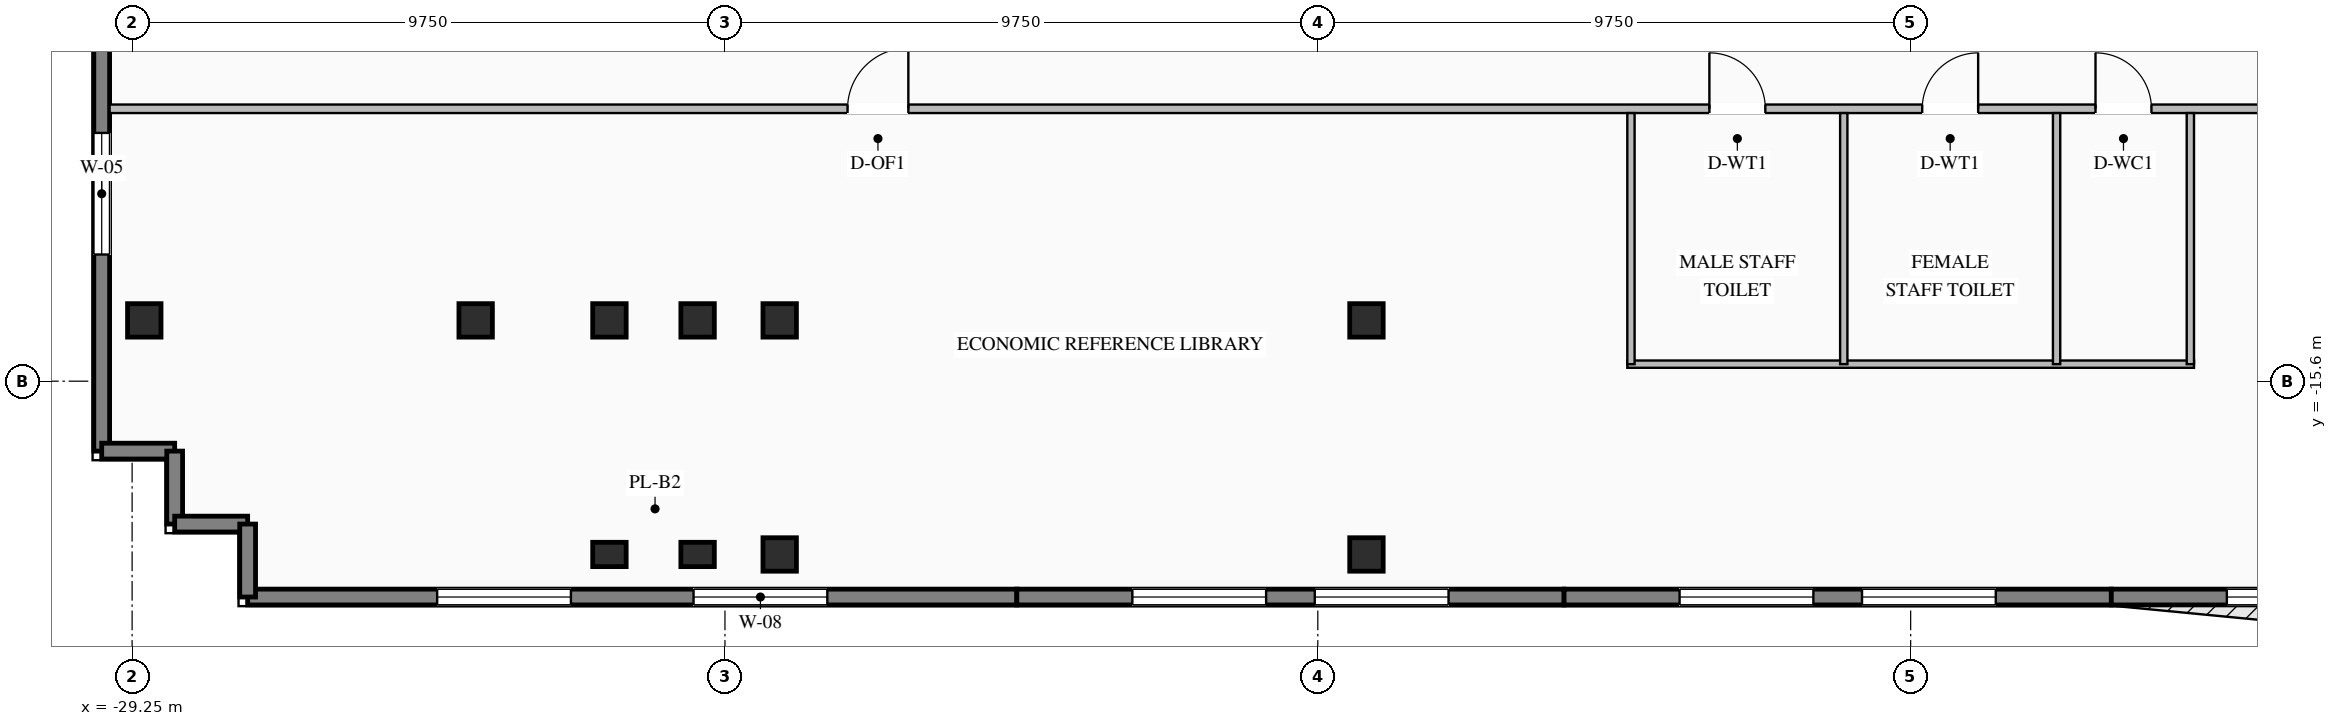
"""IFC4 building model, lengths in metres.
Left out: names, types, materials, properties, quantities, classifications, styles, units other than length and angle.
Written with IfcOpenShell. Run it as: python <this file> out.ifc"""

import sys

from ifc_helpers import new_model, si_unit, direction, frame, frame_2d, origin, origin_2d, place, context, subcontext, project, spatial, rectangle, i_section, extrude, element, fill, save


model = new_model("IFC4")
c1 = context("Model", 3, precision=1e-05, world=origin(), true_north=direction((0.0, 1.0)))
c2 = subcontext(c1, "Body", "Model", "MODEL_VIEW")
j1 = project(units=[si_unit("LENGTHUNIT", "METRE"), si_unit("PLANEANGLEUNIT", "RADIAN")], contexts=[c1])
p1 = place(None, origin())
s1 = spatial("IfcSite", under=j1, at=p1, CompositionType="ELEMENT")
p2 = place(p1, origin())
s2 = spatial("IfcBuilding", under=s1, at=p2, CompositionType="ELEMENT")
p3 = place(p2, frame((0.0, 0.0, 204.3)))
s3 = spatial("IfcBuildingStorey", under=s2, at=p3, CompositionType="ELEMENT", Elevation=204.3)
for number, where, z_axis, x_axis in (
    (1, (-21.4, -14.6, 0.0), (0.0, 0.0, 1.0), (1.0, 0.0, 0.0)),
    (2, (-19.95, -14.6, 0.0), (0.0, 0.0, 1.0), (1.0, 0.0, 0.0)),
    (3, (-18.6, -14.6, 0.0), (0.0, 0.0, 1.0), (1.0, 0.0, 0.0)),
    (4, (-8.95, -14.6, 0.0), (0.0, 0.0, 1.0), (1.0, 0.0, 0.0)),
    (5, (-23.6, -14.6, 0.0), (0.0, 0.0, 1.0), (1.0, 0.0, 0.0)),
):
    element("IfcColumn", number, at=place(p3, frame(where, z_axis=z_axis, x_axis=x_axis)), inside=s3, PredefinedType="COLUMN", context=c2, shape_type="SweptSolid", body=[
        extrude(i_section(OverallWidth=0.55, OverallDepth=0.55, WebThickness=0.024, FlangeThickness=0.036, at=origin_2d()), origin(), (0.0, 0.0, 1.0), 4.2),
    ])
for number, where, z_axis, x_axis in (
    (6, (-18.6, -18.45, -0.28), (0.0, 0.0, 1.0), (1.0, 0.0, 0.0)),
    (7, (-8.95, -18.45, -0.28), (0.0, 0.0, 1.0), (1.0, 0.0, 0.0)),
    (8, (-29.05, -14.6, -0.28), (0.0, 0.0, 1.0), (1.0, 0.0, 0.0)),
):
    element("IfcColumn", number, at=place(p3, frame(where, z_axis=z_axis, x_axis=x_axis)), inside=s3, PredefinedType="COLUMN", context=c2, shape_type="SweptSolid", body=[
        extrude(i_section(OverallWidth=0.55, OverallDepth=0.55, WebThickness=0.024, FlangeThickness=0.036, at=origin_2d()), origin(), (0.0, 0.0, 1.0), 4.48),
    ])
for number, where, z_axis, x_axis in (
    (9, (-21.4, -18.45, -0.28), (0.0, 0.0, 1.0), (1.0, 0.0, 0.0)),
    (10, (-19.95, -18.45, -0.28), (0.0, 0.0, 1.0), (1.0, 0.0, 0.0)),
):
    element("IfcColumn", number, at=place(p3, frame(where, z_axis=z_axis, x_axis=x_axis)), inside=s3, PredefinedType="PILASTER", context=c2, shape_type="SweptSolid", body=[
        extrude(rectangle(XDim=0.55, YDim=0.4, at=origin_2d()), origin(), (0.0, 0.0, 1.0), 4.48),
    ])
p4 = place(p3, frame((-14.7, -19.15, 0.0), z_axis=(0.0, 0.0, 1.0), x_axis=(-1.0, 0.0, 0.0)))
e11 = element("IfcWall", 11, at=p4, inside=s3, PredefinedType="STANDARD", context=c2, shape_type="SweptSolid", body=[
    extrude(rectangle(XDim=12.65, YDim=0.26, at=frame_2d((6.325, 0.0))), origin(), (0.0, 0.0, 1.0), 4.0),
])
p5 = place(p4, frame((3.117, 0.0, 0.76)))
e12 = element("IfcOpeningElement", 12, at=p5, cuts=e11, PredefinedType="OPENING", context=c2, shape_type="SweptSolid", body=[
    extrude(rectangle(XDim=2.2, YDim=2.25, at=frame_2d((1.1, 1.125))), frame((0.0, 0.14, 0.0), z_axis=(0.0, -1.0, 0.0), x_axis=(1.0, 0.0, 0.0)), (0.0, 0.0, 1.0), 0.28),
])
p6 = place(p4, frame((7.333, 0.0, 0.76)))
e13 = element("IfcOpeningElement", 13, at=p6, cuts=e11, PredefinedType="OPENING", context=c2, shape_type="SweptSolid", body=[
    extrude(rectangle(XDim=2.2, YDim=2.25, at=frame_2d((1.1, 1.125))), frame((0.0, 0.14, 0.0), z_axis=(0.0, -1.0, 0.0), x_axis=(1.0, 0.0, 0.0)), (0.0, 0.0, 1.0), 0.28),
])
p7 = place(p3, frame((-5.7, -19.15, 0.0), z_axis=(0.0, 0.0, 1.0), x_axis=(-1.0, 0.0, 0.0)))
e14 = element("IfcWall", 14, at=p7, inside=s3, PredefinedType="STANDARD", context=c2, shape_type="SweptSolid", body=[
    extrude(rectangle(XDim=9.0, YDim=0.26, at=frame_2d((4.5, 0.0))), origin(), (0.0, 0.0, 1.0), 4.0),
])
p8 = place(p7, frame((1.9, 0.0, 0.76)))
e15 = element("IfcOpeningElement", 15, at=p8, cuts=e14, PredefinedType="OPENING", context=c2, shape_type="SweptSolid", body=[
    extrude(rectangle(XDim=2.2, YDim=2.25, at=frame_2d((1.1, 1.125))), frame((0.0, 0.14, 0.0), z_axis=(0.0, -1.0, 0.0), x_axis=(1.0, 0.0, 0.0)), (0.0, 0.0, 1.0), 0.28),
])
p9 = place(p7, frame((4.9, 0.0, 0.76)))
e16 = element("IfcOpeningElement", 16, at=p9, cuts=e14, PredefinedType="OPENING", context=c2, shape_type="SweptSolid", body=[
    extrude(rectangle(XDim=2.2, YDim=2.25, at=frame_2d((1.1, 1.125))), frame((0.0, 0.14, 0.0), z_axis=(0.0, -1.0, 0.0), x_axis=(1.0, 0.0, 0.0)), (0.0, 0.0, 1.0), 0.28),
])
p10 = place(p3, frame((3.3, -19.15, 0.0), z_axis=(0.0, 0.0, 1.0), x_axis=(-1.0, 0.0, 0.0)))
e17 = element("IfcWall", 17, at=p10, inside=s3, PredefinedType="STANDARD", context=c2, shape_type="SweptSolid", body=[
    extrude(rectangle(XDim=9.0, YDim=0.26, at=frame_2d((4.5, 0.0))), origin(), (0.0, 0.0, 1.0), 4.0),
])
p11 = place(p10, frame((1.9, 0.0, 0.76)))
e18 = element("IfcOpeningElement", 18, at=p11, cuts=e17, PredefinedType="OPENING", context=c2, shape_type="SweptSolid", body=[
    extrude(rectangle(XDim=2.2, YDim=2.25, at=frame_2d((1.1, 1.125))), frame((0.0, 0.14, 0.0), z_axis=(0.0, -1.0, 0.0), x_axis=(1.0, 0.0, 0.0)), (0.0, 0.0, 1.0), 0.28),
])
p12 = place(p10, frame((4.9, 0.0, 0.76)))
e19 = element("IfcOpeningElement", 19, at=p12, cuts=e17, PredefinedType="OPENING", context=c2, shape_type="SweptSolid", body=[
    extrude(rectangle(XDim=2.2, YDim=2.25, at=frame_2d((1.1, 1.125))), frame((0.0, 0.14, 0.0), z_axis=(0.0, -1.0, 0.0), x_axis=(1.0, 0.0, 0.0)), (0.0, 0.0, 1.0), 0.28),
])
p13 = place(p3, frame((12.3, -19.15, 0.0), z_axis=(0.0, 0.0, 1.0), x_axis=(-1.0, 0.0, 0.0)))
e20 = element("IfcWall", 20, at=p13, inside=s3, PredefinedType="STANDARD", context=c2, shape_type="SweptSolid", body=[
    extrude(rectangle(XDim=9.0, YDim=0.26, at=frame_2d((4.5, 0.0))), origin(), (0.0, 0.0, 1.0), 4.0),
])
p14 = place(p13, frame((1.9, 0.0, 0.76)))
e21 = element("IfcOpeningElement", 21, at=p14, cuts=e20, PredefinedType="OPENING", context=c2, shape_type="SweptSolid", body=[
    extrude(rectangle(XDim=2.2, YDim=2.25, at=frame_2d((1.1, 1.125))), frame((0.0, 0.14, 0.0), z_axis=(0.0, -1.0, 0.0), x_axis=(1.0, 0.0, 0.0)), (0.0, 0.0, 1.0), 0.28),
])
p15 = place(p13, frame((4.9, 0.0, 0.76)))
e22 = element("IfcOpeningElement", 22, at=p15, cuts=e20, PredefinedType="OPENING", context=c2, shape_type="SweptSolid", body=[
    extrude(rectangle(XDim=2.2, YDim=2.25, at=frame_2d((1.1, 1.125))), frame((0.0, 0.14, 0.0), z_axis=(0.0, -1.0, 0.0), x_axis=(1.0, 0.0, 0.0)), (0.0, 0.0, 1.0), 0.28),
])
p16 = place(p3, frame((-29.75, -16.75, 0.0), z_axis=(0.0, 0.0, 1.0), x_axis=(0.0, 1.0, 0.0)))
e23 = element("IfcWall", 23, at=p16, inside=s3, PredefinedType="STANDARD", context=c2, shape_type="SweptSolid", body=[
    extrude(rectangle(XDim=15.85, YDim=0.26, at=frame_2d((7.925, 0.0))), origin(), (0.0, 0.0, 1.0), 4.0),
])
p17 = place(p16, frame((3.233, 0.0, 0.76)))
e24 = element("IfcOpeningElement", 24, at=p17, cuts=e23, PredefinedType="OPENING", context=c2, shape_type="SweptSolid", body=[
    extrude(rectangle(XDim=2.0, YDim=2.05, at=frame_2d((1.0, 1.025))), frame((0.0, 0.14, 0.0), z_axis=(0.0, -1.0, 0.0), x_axis=(1.0, 0.0, 0.0)), (0.0, 0.0, 1.0), 0.28),
])
p18 = place(p16, frame((9.567, 0.0, 0.76)))
e25 = element("IfcOpeningElement", 25, at=p18, cuts=e23, PredefinedType="OPENING", context=c2, shape_type="SweptSolid", body=[
    extrude(rectangle(XDim=2.0, YDim=2.05, at=frame_2d((1.0, 1.025))), frame((0.0, 0.14, 0.0), z_axis=(0.0, -1.0, 0.0), x_axis=(1.0, 0.0, 0.0)), (0.0, 0.0, 1.0), 0.28),
])
for number, where, z_axis, x_axis in (
    (26, (-29.75, -16.75, 0.0), (0.0, 0.0, 1.0), (1.0, 0.0, 0.0)),
    (27, (-28.55, -16.75, 0.0), (0.0, 0.0, 1.0), (0.0, -1.0, 0.0)),
    (28, (-28.55, -17.95, 0.0), (0.0, 0.0, 1.0), (1.0, 0.0, 0.0)),
    (29, (-27.35, -17.95, 0.0), (0.0, 0.0, 1.0), (0.0, -1.0, 0.0)),
):
    element("IfcWall", number, at=place(p3, frame(where, z_axis=z_axis, x_axis=x_axis)), inside=s3, PredefinedType="STANDARD", context=c2, shape_type="SweptSolid", body=[
        extrude(rectangle(XDim=1.2, YDim=0.26, at=frame_2d((0.6, 0.0))), origin(), (0.0, 0.0, 1.0), 4.0),
    ])
p19 = place(p3, frame((-29.62, -11.12, 0.0), z_axis=(0.0, 0.0, 1.0), x_axis=(1.0, 0.0, 0.0)))
e30 = element("IfcWall", 30, at=p19, inside=s3, PredefinedType="STANDARD", context=c2, shape_type="SweptSolid", body=[
    extrude(rectangle(XDim=56.84, YDim=0.14, at=frame_2d((28.42, 0.0))), origin(), (0.0, 0.0, 1.0), 4.0),
])
p20 = place(p19, frame((26.31, 0.0, 0.0)))
e31 = element("IfcOpeningElement", 31, at=p20, cuts=e30, PredefinedType="OPENING", context=c2, shape_type="SweptSolid", body=[
    extrude(rectangle(XDim=0.92, YDim=2.08, at=frame_2d((0.46, 1.04))), frame((0.0, 0.08, 0.0), z_axis=(0.0, -1.0, 0.0), x_axis=(1.0, 0.0, 0.0)), (0.0, 0.0, 1.0), 0.16),
])
p21 = place(p19, frame((29.81, 0.0, 0.0)))
e32 = element("IfcOpeningElement", 32, at=p21, cuts=e30, PredefinedType="OPENING", context=c2, shape_type="SweptSolid", body=[
    extrude(rectangle(XDim=0.92, YDim=2.08, at=frame_2d((0.46, 1.04))), frame((0.0, 0.08, 0.0), z_axis=(0.0, -1.0, 0.0), x_axis=(1.0, 0.0, 0.0)), (0.0, 0.0, 1.0), 0.16),
])
p22 = place(p19, frame((32.66, 0.0, 0.0)))
e33 = element("IfcOpeningElement", 33, at=p22, cuts=e30, PredefinedType="OPENING", context=c2, shape_type="SweptSolid", body=[
    extrude(rectangle(XDim=0.92, YDim=2.08, at=frame_2d((0.46, 1.04))), frame((0.0, 0.08, 0.0), z_axis=(0.0, -1.0, 0.0), x_axis=(1.0, 0.0, 0.0)), (0.0, 0.0, 1.0), 0.16),
])
p23 = place(p19, frame((12.136, 0.0, 0.0)))
e34 = element("IfcOpeningElement", 34, at=p23, cuts=e30, PredefinedType="OPENING", context=c2, shape_type="SweptSolid", body=[
    extrude(rectangle(XDim=1.0, YDim=2.08, at=frame_2d((0.5, 1.04))), frame((0.0, 0.08, 0.0), z_axis=(0.0, -1.0, 0.0), x_axis=(1.0, 0.0, 0.0)), (0.0, 0.0, 1.0), 0.16),
])
p24 = place(p19, frame((44.904, 0.0, 0.0)))
e35 = element("IfcOpeningElement", 35, at=p24, cuts=e30, PredefinedType="OPENING", context=c2, shape_type="SweptSolid", body=[
    extrude(rectangle(XDim=1.0, YDim=2.08, at=frame_2d((0.5, 1.04))), frame((0.0, 0.08, 0.0), z_axis=(0.0, -1.0, 0.0), x_axis=(1.0, 0.0, 0.0)), (0.0, 0.0, 1.0), 0.16),
])
p25 = place(p3, frame((-4.66, -15.32, 0.0), z_axis=(0.0, 0.0, 1.0), x_axis=(1.0, 0.0, 0.0)))
e36 = element("IfcWall", 36, at=p25, inside=s3, PredefinedType="STANDARD", context=c2, shape_type="SweptSolid", body=[
    extrude(rectangle(XDim=9.32, YDim=0.12, at=frame_2d((4.66, 0.0))), origin(), (0.0, 0.0, 1.0), 4.0),
])
for number, where, z_axis, x_axis in (
    (37, (-4.6, -15.32, 0.0), (0.0, 0.0, 1.0), (0.0, 1.0, 0.0)),
    (38, (-1.1, -15.32, 0.0), (0.0, 0.0, 1.0), (0.0, 1.0, 0.0)),
    (39, (2.4, -15.32, 0.0), (0.0, 0.0, 1.0), (0.0, 1.0, 0.0)),
    (40, (4.6, -15.32, 0.0), (0.0, 0.0, 1.0), (0.0, 1.0, 0.0)),
):
    element("IfcWall", number, at=place(p3, frame(where, z_axis=z_axis, x_axis=x_axis)), inside=s3, PredefinedType="STANDARD", context=c2, shape_type="SweptSolid", body=[
        extrude(rectangle(XDim=4.13, YDim=0.12, at=frame_2d((2.065, 0.0))), origin(), (0.0, 0.0, 1.0), 4.0),
    ])
p26 = place(p5, origin())
e41 = element("IfcWindow", 41, at=p26, inside=s3, PartitioningType="DOUBLE_PANEL_VERTICAL", PredefinedType="WINDOW", context=c2, shape_type="SweptSolid", body=[
    extrude(rectangle(XDim=2.2, YDim=2.25, at=frame_2d((1.1, 1.125))), frame((0.0, 0.03, 0.0), z_axis=(0.0, -1.0, 0.0), x_axis=(1.0, 0.0, 0.0)), (0.0, 0.0, 1.0), 0.06),
])
fill(e12, e41)
p27 = place(p6, origin())
e42 = element("IfcWindow", 42, at=p27, inside=s3, PartitioningType="DOUBLE_PANEL_VERTICAL", PredefinedType="WINDOW", context=c2, shape_type="SweptSolid", body=[
    extrude(rectangle(XDim=2.2, YDim=2.25, at=frame_2d((1.1, 1.125))), frame((0.0, 0.03, 0.0), z_axis=(0.0, -1.0, 0.0), x_axis=(1.0, 0.0, 0.0)), (0.0, 0.0, 1.0), 0.06),
])
fill(e13, e42)
p28 = place(p8, origin())
e43 = element("IfcWindow", 43, at=p28, inside=s3, PartitioningType="DOUBLE_PANEL_VERTICAL", PredefinedType="WINDOW", context=c2, shape_type="SweptSolid", body=[
    extrude(rectangle(XDim=2.2, YDim=2.25, at=frame_2d((1.1, 1.125))), frame((0.0, 0.03, 0.0), z_axis=(0.0, -1.0, 0.0), x_axis=(1.0, 0.0, 0.0)), (0.0, 0.0, 1.0), 0.06),
])
fill(e15, e43)
p29 = place(p9, origin())
e44 = element("IfcWindow", 44, at=p29, inside=s3, PartitioningType="DOUBLE_PANEL_VERTICAL", PredefinedType="WINDOW", context=c2, shape_type="SweptSolid", body=[
    extrude(rectangle(XDim=2.2, YDim=2.25, at=frame_2d((1.1, 1.125))), frame((0.0, 0.03, 0.0), z_axis=(0.0, -1.0, 0.0), x_axis=(1.0, 0.0, 0.0)), (0.0, 0.0, 1.0), 0.06),
])
fill(e16, e44)
p30 = place(p11, origin())
e45 = element("IfcWindow", 45, at=p30, inside=s3, PartitioningType="DOUBLE_PANEL_VERTICAL", PredefinedType="WINDOW", context=c2, shape_type="SweptSolid", body=[
    extrude(rectangle(XDim=2.2, YDim=2.25, at=frame_2d((1.1, 1.125))), frame((0.0, 0.03, 0.0), z_axis=(0.0, -1.0, 0.0), x_axis=(1.0, 0.0, 0.0)), (0.0, 0.0, 1.0), 0.06),
])
fill(e18, e45)
p31 = place(p12, origin())
e46 = element("IfcWindow", 46, at=p31, inside=s3, PartitioningType="DOUBLE_PANEL_VERTICAL", PredefinedType="WINDOW", context=c2, shape_type="SweptSolid", body=[
    extrude(rectangle(XDim=2.2, YDim=2.25, at=frame_2d((1.1, 1.125))), frame((0.0, 0.03, 0.0), z_axis=(0.0, -1.0, 0.0), x_axis=(1.0, 0.0, 0.0)), (0.0, 0.0, 1.0), 0.06),
])
fill(e19, e46)
p32 = place(p15, origin())
e47 = element("IfcWindow", 47, at=p32, inside=s3, PartitioningType="DOUBLE_PANEL_VERTICAL", PredefinedType="WINDOW", context=c2, shape_type="SweptSolid", body=[
    extrude(rectangle(XDim=2.2, YDim=2.25, at=frame_2d((1.1, 1.125))), frame((0.0, 0.03, 0.0), z_axis=(0.0, -1.0, 0.0), x_axis=(1.0, 0.0, 0.0)), (0.0, 0.0, 1.0), 0.06),
])
fill(e22, e47)
p33 = place(p17, origin())
e48 = element("IfcWindow", 48, at=p33, inside=s3, PartitioningType="DOUBLE_PANEL_VERTICAL", PredefinedType="WINDOW", context=c2, shape_type="SweptSolid", body=[
    extrude(rectangle(XDim=2.0, YDim=2.05, at=frame_2d((1.0, 1.025))), frame((0.0, 0.03, 0.0), z_axis=(0.0, -1.0, 0.0), x_axis=(1.0, 0.0, 0.0)), (0.0, 0.0, 1.0), 0.06),
])
fill(e24, e48)
p34 = place(p20, origin())
e49 = element("IfcDoor", 49, at=p34, inside=s3, OperationType="SINGLE_SWING_LEFT", PredefinedType="DOOR", context=c2, shape_type="SweptSolid", body=[
    extrude(rectangle(XDim=0.92, YDim=2.08, at=frame_2d((0.46, 1.04))), frame((0.0, 0.025, 0.0), z_axis=(0.0, -1.0, 0.0), x_axis=(1.0, 0.0, 0.0)), (0.0, 0.0, 1.0), 0.05),
])
fill(e31, e49)
p35 = place(p21, origin())
e50 = element("IfcDoor", 50, at=p35, inside=s3, OperationType="SINGLE_SWING_RIGHT", PredefinedType="DOOR", context=c2, shape_type="SweptSolid", body=[
    extrude(rectangle(XDim=0.92, YDim=2.08, at=frame_2d((0.46, 1.04))), frame((0.0, 0.025, 0.0), z_axis=(0.0, -1.0, 0.0), x_axis=(1.0, 0.0, 0.0)), (0.0, 0.0, 1.0), 0.05),
])
fill(e32, e50)
p36 = place(p22, origin())
e51 = element("IfcDoor", 51, at=p36, inside=s3, OperationType="SINGLE_SWING_LEFT", PredefinedType="DOOR", context=c2, shape_type="SweptSolid", body=[
    extrude(rectangle(XDim=0.92, YDim=2.08, at=frame_2d((0.46, 1.04))), frame((0.0, 0.025, 0.0), z_axis=(0.0, -1.0, 0.0), x_axis=(1.0, 0.0, 0.0)), (0.0, 0.0, 1.0), 0.05),
])
fill(e33, e51)
p37 = place(p23, origin())
e52 = element("IfcDoor", 52, at=p37, inside=s3, OperationType="SINGLE_SWING_RIGHT", PredefinedType="DOOR", context=c2, shape_type="SweptSolid", body=[
    extrude(rectangle(XDim=1.0, YDim=2.08, at=frame_2d((0.5, 1.04))), frame((0.0, 0.025, 0.0), z_axis=(0.0, -1.0, 0.0), x_axis=(1.0, 0.0, 0.0)), (0.0, 0.0, 1.0), 0.05),
])
fill(e34, e52)
save(model, sys.argv[1])
